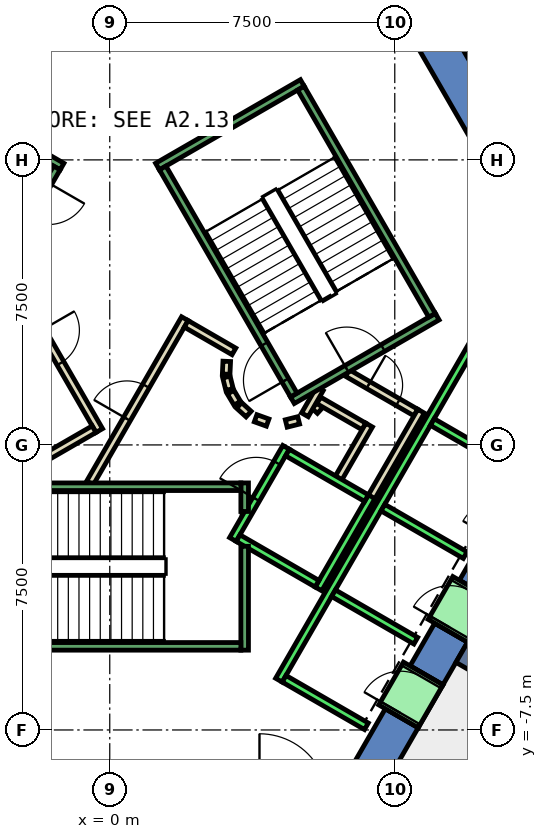
"""IFC4 building model, lengths in metres.
Left out: names, types, materials, properties, quantities, classifications, styles, units other than length and angle.
Written with IfcOpenShell. Run it as: python <this file> out.ifc"""

import sys

from ifc_helpers import new_model, si_unit, direction, frame, frame_2d, origin, place, context, subcontext, project, spatial, polyline, rectangle, outline, extrude, element, fill, save


model = new_model("IFC4")
c1 = context("Model", 3, precision=1e-05, world=origin(), true_north=direction((0.0, 1.0)))
c2 = subcontext(c1, "Body", "Model", "MODEL_VIEW")
j1 = project(units=[si_unit("LENGTHUNIT", "METRE"), si_unit("PLANEANGLEUNIT", "RADIAN")], contexts=[c1])
p1 = place(None, origin())
s1 = spatial("IfcSite", under=j1, at=p1, CompositionType="ELEMENT")
p2 = place(p1, origin())
s2 = spatial("IfcBuilding", under=s1, at=p2, CompositionType="ELEMENT")
p3 = place(p2, frame((0.0, 0.0, 51.8)))
s3 = spatial("IfcBuildingStorey", under=s2, at=p3, CompositionType="ELEMENT", Elevation=51.8)
p4 = place(p3, frame((0.0, 0.0, -0.4)))
e1 = element("IfcWall", 1, at=p4, inside=s3, PredefinedType="SHEAR", context=c2, shape_type="SweptSolid", body=[
    extrude(outline(polyline([(8.517, 11.748), (7.651, 11.248), (12.702, 2.5), (13.856, 2.5), (8.517, 11.748)])), origin(), (0.0, 0.0, 1.0), 4.2),
])
p5 = place(p3, frame((0.0, 0.0, -0.4)))
e2 = element("IfcWall", 2, at=p5, inside=s3, PredefinedType="SHEAR", context=c2, shape_type="SweptSolid", body=[
    extrude(outline(polyline([(8.117, -7.44), (7.252, -6.94), (6.351, -8.5), (6.928, -9.5), (8.117, -7.44)])), origin(), (0.0, 0.0, 1.0), 4.2),
])
p6 = place(p3, frame((0.0, 0.0, -0.4)))
e3 = element("IfcWall", 3, at=p6, inside=s3, PredefinedType="SHEAR", context=c2, shape_type="SweptSolid", body=[
    extrude(outline(polyline([(9.417, -5.189), (8.551, -4.689), (7.902, -5.814), (8.767, -6.314), (9.417, -5.189)])), origin(), (0.0, 0.0, 1.0), 4.2),
])
p7 = place(p3, frame((0.0, 0.0, -0.4)))
e4 = element("IfcWall", 4, at=p7, inside=s3, PredefinedType="SHEAR", context=c2, shape_type="SweptSolid", body=[
    extrude(outline(polyline([(10.717, -2.937), (9.851, -2.437), (9.201, -3.563), (10.067, -4.063), (10.717, -2.937)])), origin(), (0.0, 0.0, 1.0), 4.2),
])
p8 = place(p3, frame((0.0, 0.0, 3.6)))
e5 = element("IfcWall", 5, at=p8, inside=s3, PredefinedType="SHEAR", context=c2, shape_type="SweptSolid", body=[
    extrude(outline(polyline([(8.767, -6.314), (7.902, -5.814), (7.252, -6.94), (8.117, -7.44), (8.767, -6.314)])), origin(), (0.0, 0.0, 1.0), 0.2),
])
p9 = place(p3, frame((0.0, 0.0, 3.6)))
e6 = element("IfcWall", 6, at=p9, inside=s3, PredefinedType="SHEAR", context=c2, shape_type="SweptSolid", body=[
    extrude(outline(polyline([(10.067, -4.063), (9.201, -3.563), (8.551, -4.689), (9.417, -5.189), (10.067, -4.063)])), origin(), (0.0, 0.0, 1.0), 0.2),
])
p10 = place(p3, frame((9.31, -5.375, -0.4), z_axis=(0.0, 0.0, 1.0), x_axis=(0.866017533419, -0.500013631625, 0.0)))
e7 = element("IfcWall", 7, at=p10, inside=s3, PredefinedType="SHEAR", context=c2, shape_type="SweptSolid", body=[
    extrude(rectangle(XDim=9.0, YDim=0.8, at=frame_2d((4.5, 0.0))), origin(), (0.0, 0.0, 1.0), 4.2),
])
p11 = place(p3, frame((5.39, 0.898, 0.0), z_axis=(0.0, 0.0, 1.0), x_axis=(0.673828488714, 0.738887791073, 0.0)))
e8 = element("IfcWall", 8, at=p11, inside=s3, PredefinedType="PARTITIONING", context=c2, shape_type="SweptSolid", body=[
    extrude(rectangle(XDim=0.263, YDim=0.2, at=frame_2d((0.131, 0.0))), origin(), (0.0, 0.0, 1.0), 3.8),
])
p12 = place(p3, frame((5.499, 1.172, 0.0), z_axis=(0.0, 0.0, 1.0), x_axis=(0.866333505267, -0.499465972466, 0.0)))
e9 = element("IfcWall", 9, at=p12, inside=s3, PredefinedType="PARTITIONING", context=c2, shape_type="SweptSolid", body=[
    extrude(rectangle(XDim=1.374, YDim=0.2, at=frame_2d((0.687, 0.0))), origin(), (0.0, 0.0, 1.0), 3.8),
])
p13 = place(p3, frame((6.826, 0.522, 0.0), z_axis=(0.0, 0.0, 1.0), x_axis=(-0.500016722714, -0.866015748706, 0.0)))
e10 = element("IfcWall", 10, at=p13, inside=s3, PredefinedType="PARTITIONING", context=c2, shape_type="SweptSolid", body=[
    extrude(rectangle(XDim=1.7, YDim=0.2, at=frame_2d((0.85, 0.0))), origin(), (0.0, 0.0, 1.0), 3.8),
])
p14 = place(p3, frame((6.25, 1.894, 0.0), z_axis=(0.0, 0.0, 1.0), x_axis=(0.866043184279, -0.499969202016, 0.0)))
e11 = element("IfcWall", 11, at=p14, inside=s3, PredefinedType="PARTITIONING", context=c2, shape_type="SweptSolid", body=[
    extrude(rectangle(XDim=2.084, YDim=0.2, at=frame_2d((1.042, 0.0))), origin(), (0.0, 0.0, 1.0), 3.8),
])
p15 = place(p14, frame((0.642, 0.0, 0.0)))
e12 = element("IfcOpeningElement", 12, at=p15, cuts=e11, PredefinedType="OPENING", context=c2, shape_type="SweptSolid", body=[
    extrude(rectangle(XDim=0.9, YDim=2.1, at=frame_2d((0.45, 1.05))), frame((0.0, 0.11, 0.0), z_axis=(0.0, -1.0, 0.0), x_axis=(1.0, 0.0, 0.0)), (0.0, 0.0, 1.0), 0.22),
])
p16 = place(p3, frame((8.192, 0.888, 0.0), z_axis=(0.0, 0.0, 1.0), x_axis=(-0.499940625693, -0.866059680843, 0.0)))
e13 = element("IfcWall", 13, at=p16, inside=s3, PredefinedType="PARTITIONING", context=c2, shape_type="SweptSolid", body=[
    extrude(rectangle(XDim=2.68, YDim=0.2, at=frame_2d((1.34, 0.0))), origin(), (0.0, 0.0, 1.0), 3.8),
])
p17 = place(p3, frame((5.135, 0.793, 0.0), z_axis=(0.0, 0.0, 1.0), x_axis=(0.499526442893, 0.866298639529, 0.0)))
e14 = element("IfcWall", 14, at=p17, inside=s3, PredefinedType="PARTITIONING", context=c2, shape_type="SweptSolid", body=[
    extrude(rectangle(XDim=0.791, YDim=0.2, at=frame_2d((0.396, 0.0))), origin(), (0.0, 0.0, 1.0), 3.8),
])
p18 = place(p3, frame((-0.52, -1.0, 0.0), z_axis=(0.0, 0.0, 1.0), x_axis=(0.50011622646, 0.865958290007, 0.0)))
e15 = element("IfcWall", 15, at=p18, inside=s3, PredefinedType="PARTITIONING", context=c2, shape_type="SweptSolid", body=[
    extrude(rectangle(XDim=4.991, YDim=0.2, at=frame_2d((2.496, 0.0))), origin(), (0.0, 0.0, 1.0), 3.8),
])
p19 = place(p18, frame((1.945, 0.0, 0.0)))
e16 = element("IfcOpeningElement", 16, at=p19, cuts=e15, PredefinedType="OPENING", context=c2, shape_type="SweptSolid", body=[
    extrude(rectangle(XDim=1.0, YDim=2.1, at=frame_2d((0.5, 1.05))), frame((0.0, 0.11, 0.0), z_axis=(0.0, -1.0, 0.0), x_axis=(1.0, 0.0, 0.0)), (0.0, 0.0, 1.0), 0.22),
])
p20 = place(p3, frame((2.012, 3.186, 0.0), z_axis=(0.0, 0.0, 1.0), x_axis=(0.865891012941, -0.500232699559, 0.0)))
e17 = element("IfcWall", 17, at=p20, inside=s3, PredefinedType="PARTITIONING", context=c2, shape_type="SweptSolid", body=[
    extrude(rectangle(XDim=1.449, YDim=0.2, at=frame_2d((0.725, 0.0))), origin(), (0.0, 0.0, 1.0), 3.8),
])
p21 = place(p3, frame((3.079, 2.199, 0.0), z_axis=(0.0, 0.0, 1.0), x_axis=(-0.047771483479, -0.998858290933, 0.0)))
e18 = element("IfcWall", 18, at=p21, inside=s3, PredefinedType="PARTITIONING", context=c2, shape_type="SweptSolid", body=[
    extrude(rectangle(XDim=0.337, YDim=0.2, at=frame_2d((0.169, 0.0))), origin(), (0.0, 0.0, 1.0), 3.8),
])
p22 = place(p3, frame((3.07, 1.786, 0.0), z_axis=(0.0, 0.0, 1.0), x_axis=(0.242705583207, -0.970099994784, 0.0)))
e19 = element("IfcWall", 19, at=p22, inside=s3, PredefinedType="PARTITIONING", context=c2, shape_type="SweptSolid", body=[
    extrude(rectangle(XDim=0.338, YDim=0.2, at=frame_2d((0.169, 0.0))), origin(), (0.0, 0.0, 1.0), 3.8),
])
for number, where, z_axis, x_axis in (
    (20, (3.182, 1.388, 0.0), (0.0, 0.0, 1.0), (0.512, -0.859, 0.0)),
    (21, (3.404, 1.039, 0.0), (0.0, 0.0, 1.0), (0.74, -0.672, 0.0)),
):
    element("IfcWall", number, at=place(p3, frame(where, z_axis=z_axis, x_axis=x_axis)), inside=s3, PredefinedType="PARTITIONING", context=c2, shape_type="SweptSolid", body=[
        extrude(rectangle(XDim=0.338, YDim=0.2, at=frame_2d((0.169, 0.0))), origin(), (0.0, 0.0, 1.0), 3.8),
    ])
p23 = place(p3, frame((3.838, 0.702, 0.0), z_axis=(0.0, 0.0, 1.0), x_axis=(0.941035081519, -0.338308993895, 0.0)))
e22 = element("IfcWall", 22, at=p23, inside=s3, PredefinedType="PARTITIONING", context=c2, shape_type="SweptSolid", body=[
    extrude(rectangle(XDim=0.337, YDim=0.2, at=frame_2d((0.168, 0.0))), origin(), (0.0, 0.0, 1.0), 3.8),
])
p24 = place(p3, frame((4.644, 0.564, 0.0), z_axis=(0.0, 0.0, 1.0), x_axis=(0.969929076366, 0.243387729394, 0.0)))
e23 = element("IfcWall", 23, at=p24, inside=s3, PredefinedType="PARTITIONING", context=c2, shape_type="SweptSolid", body=[
    extrude(rectangle(XDim=0.337, YDim=0.2, at=frame_2d((0.168, 0.0))), origin(), (0.0, 0.0, 1.0), 3.8),
])
p25 = place(p3, frame((-2.771, 4.7, 0.0), z_axis=(0.0, 0.0, 1.0), x_axis=(0.499969479948, -0.866043023828, 0.0)))
e24 = element("IfcWall", 24, at=p25, inside=s3, PredefinedType="PARTITIONING", context=c2, shape_type="SweptSolid", body=[
    extrude(rectangle(XDim=4.99, YDim=0.2, at=frame_2d((2.495, 0.0))), origin(), (0.0, 0.0, 1.0), 3.8),
])
p26 = place(p25, frame((1.945, 0.0, 0.0)))
e25 = element("IfcOpeningElement", 25, at=p26, cuts=e24, PredefinedType="OPENING", context=c2, shape_type="SweptSolid", body=[
    extrude(rectangle(XDim=1.0, YDim=2.1, at=frame_2d((0.5, 1.05))), frame((0.0, 0.11, 0.0), z_axis=(0.0, -1.0, 0.0), x_axis=(1.0, 0.0, 0.0)), (0.0, 0.0, 1.0), 0.22),
])
p27 = place(p3, frame((-0.412, 0.414, 0.0), z_axis=(0.0, 0.0, 1.0), x_axis=(-0.866017369001, -0.500013916395, 0.0)))
e26 = element("IfcWall", 26, at=p27, inside=s3, PredefinedType="PARTITIONING", context=c2, shape_type="SweptSolid", body=[
    extrude(rectangle(XDim=1.45, YDim=0.2, at=frame_2d((0.725, 0.0))), origin(), (0.0, 0.0, 1.0), 3.8),
])
p28 = place(p3, frame((12.401, -7.621, 0.0), z_axis=(0.0, 0.0, 1.0), x_axis=(-0.499983724212, -0.866034800411, 0.0)))
e27 = element("IfcWall", 27, at=p28, inside=s3, PredefinedType="PARTITIONING", context=c2, shape_type="SweptSolid", body=[
    extrude(rectangle(XDim=9.302, YDim=0.2, at=frame_2d((4.651, 0.0))), origin(), (0.0, 0.0, 1.0), 3.8),
])
p29 = place(p3, frame((3.24, -2.488, 0.0), z_axis=(0.0, 0.0, 1.0), x_axis=(0.49994636267, 0.866056369097, 0.0)))
e28 = element("IfcWall", 28, at=p29, inside=s3, PredefinedType="STANDARD", context=c2, shape_type="SweptSolid", body=[
    extrude(rectangle(XDim=2.8, YDim=0.2, at=frame_2d((1.4, 0.0))), origin(), (0.0, 0.0, 1.0), 3.8),
])
p30 = place(p29, frame((1.225, 0.0, 0.0)))
e29 = element("IfcOpeningElement", 29, at=p30, cuts=e28, PredefinedType="OPENING", context=c2, shape_type="SweptSolid", body=[
    extrude(rectangle(XDim=1.1, YDim=2.1, at=frame_2d((0.55, 1.05))), frame((0.0, 0.11, 0.0), z_axis=(0.0, -1.0, 0.0), x_axis=(1.0, 0.0, 0.0)), (0.0, 0.0, 1.0), 0.22),
])
p31 = place(p3, frame((5.492, -3.788, 0.0), z_axis=(0.0, 0.0, 1.0), x_axis=(0.500011755427, 0.866018616679, 0.0)))
e30 = element("IfcWall", 30, at=p31, inside=s3, PredefinedType="STANDARD", context=c2, shape_type="SweptSolid", body=[
    extrude(rectangle(XDim=2.8, YDim=0.2, at=frame_2d((1.4, 0.0))), origin(), (0.0, 0.0, 1.0), 3.8),
])
p32 = place(p3, frame((3.377, -2.452, 0.0), z_axis=(0.0, 0.0, 1.0), x_axis=(0.865955154139, -0.50012165622, 0.0)))
e31 = element("IfcWall", 31, at=p32, inside=s3, PredefinedType="STANDARD", context=c2, shape_type="SweptSolid", body=[
    extrude(rectangle(XDim=2.4, YDim=0.2, at=frame_2d((1.2, 0.0))), origin(), (0.0, 0.0, 1.0), 3.8),
])
p33 = place(p3, frame((4.677, -0.2, 0.0), z_axis=(0.0, 0.0, 1.0), x_axis=(0.865973769406, -0.500089422704, 0.0)))
e32 = element("IfcWall", 32, at=p33, inside=s3, PredefinedType="STANDARD", context=c2, shape_type="SweptSolid", body=[
    extrude(rectangle(XDim=2.399, YDim=0.2, at=frame_2d((1.2, 0.0))), origin(), (0.0, 0.0, 1.0), 3.8),
])
p34 = place(p3, frame((4.451, -6.19, 0.0), z_axis=(0.0, 0.0, 1.0), x_axis=(0.50000090737, 0.866024879913, 0.0)))
e33 = element("IfcWall", 33, at=p34, inside=s3, PredefinedType="STANDARD", context=c2, shape_type="SweptSolid", body=[
    extrude(rectangle(XDim=10.6, YDim=0.2, at=frame_2d((5.3, 0.0))), origin(), (0.0, 0.0, 1.0), 3.8),
])
for number, where, z_axis, x_axis in (
    (34, (4.588, -6.153, 0.0), (0.0, 0.0, 1.0), (0.866, -0.5, 0.0)),
    (35, (5.888, -3.902, 0.0), (0.0, 0.0, 1.0), (0.866, -0.5, 0.0)),
    (36, (7.188, -1.65, 0.0), (0.0, 0.0, 1.0), (0.866, -0.5, 0.0)),
    (37, (8.488, 0.602, 0.0), (0.0, 0.0, 1.0), (0.866, -0.5, 0.0)),
):
    element("IfcWall", number, at=place(p3, frame(where, z_axis=z_axis, x_axis=x_axis)), inside=s3, PredefinedType="STANDARD", context=c2, shape_type="SweptSolid", body=[
        extrude(rectangle(XDim=2.5, YDim=0.2, at=frame_2d((1.25, 0.0))), origin(), (0.0, 0.0, 1.0), 3.8),
    ])
p35 = place(p3, frame((7.598, -7.14, 0.0), z_axis=(0.0, 0.0, 1.0), x_axis=(0.500362116554, 0.865816234728, 0.0)))
e38 = element("IfcWall", 38, at=p35, inside=s3, PredefinedType="STANDARD", context=c2, shape_type="SweptSolid", body=[
    extrude(rectangle(XDim=1.299, YDim=1.2, at=frame_2d((0.65, 0.0))), origin(), (0.0, 0.0, 1.0), 2.4),
])
p36 = place(p35, frame((0.1, 0.0, 0.0)))
e39 = element("IfcOpeningElement", 39, at=p36, cuts=e38, PredefinedType="OPENING", context=c2, shape_type="SweptSolid", body=[
    extrude(rectangle(XDim=1.1, YDim=2.3, at=frame_2d((0.55, 1.15))), frame((0.0, 0.61, 0.0), z_axis=(0.0, -1.0, 0.0), x_axis=(1.0, 0.0, 0.0)), (0.0, 0.0, 1.0), 1.22),
])
p37 = place(p3, frame((8.898, -4.889, 0.0), z_axis=(0.0, 0.0, 1.0), x_axis=(0.500036693733, 0.866004217611, 0.0)))
e40 = element("IfcWall", 40, at=p37, inside=s3, PredefinedType="STANDARD", context=c2, shape_type="SweptSolid", body=[
    extrude(rectangle(XDim=1.3, YDim=1.2, at=frame_2d((0.65, 0.0))), origin(), (0.0, 0.0, 1.0), 2.4),
])
p38 = place(p37, frame((0.1, 0.0, 0.0)))
e41 = element("IfcOpeningElement", 41, at=p38, cuts=e40, PredefinedType="OPENING", context=c2, shape_type="SweptSolid", body=[
    extrude(rectangle(XDim=1.1, YDim=2.3, at=frame_2d((0.55, 1.15))), frame((0.0, 0.61, 0.0), z_axis=(0.0, -1.0, 0.0), x_axis=(1.0, 0.0, 0.0)), (0.0, 0.0, 1.0), 1.22),
])
p39 = place(p3, frame((3.55, -2.667, 0.0), z_axis=(0.0, 0.0, 1.0), x_axis=(0.0, -1.0, 0.0)))
e42 = element("IfcWall", 42, at=p39, inside=s3, PredefinedType="STANDARD", context=c2, shape_type="SweptSolid", body=[
    extrude(rectangle(XDim=2.733, YDim=0.2, at=frame_2d((1.366, 0.0))), origin(), (0.0, 0.0, 1.0), 3.8),
])
p40 = place(p3, frame((3.55, -1.0, 0.0), z_axis=(0.0, 0.0, 1.0), x_axis=(0.0, -1.0, 0.0)))
e43 = element("IfcWall", 43, at=p40, inside=s3, PredefinedType="STANDARD", context=c2, shape_type="SweptSolid", body=[
    extrude(rectangle(XDim=0.751, YDim=0.2, at=frame_2d((0.375, 0.0))), origin(), (0.0, 0.0, 1.0), 3.8),
])
p41 = place(p3, frame((-3.45, -1.1, 0.0), z_axis=(0.0, 0.0, 1.0), x_axis=(1.0, 0.0, 0.0)))
e44 = element("IfcWall", 44, at=p41, inside=s3, PredefinedType="STANDARD", context=c2, shape_type="SweptSolid", body=[
    extrude(rectangle(XDim=6.9, YDim=0.2, at=frame_2d((3.45, 0.0))), origin(), (0.0, 0.0, 1.0), 3.8),
])
p42 = place(p41, frame((0.45, 0.0, 0.0)))
e45 = element("IfcOpeningElement", 45, at=p42, cuts=e44, PredefinedType="OPENING", context=c2, shape_type="SweptSolid", body=[
    extrude(rectangle(XDim=1.1, YDim=2.2, at=frame_2d((0.55, 1.1))), frame((0.0, 0.11, 0.0), z_axis=(0.0, -1.0, 0.0), x_axis=(1.0, 0.0, 0.0)), (0.0, 0.0, 1.0), 0.22),
])
p43 = place(p3, frame((-3.45, -5.3, 0.0), z_axis=(0.0, 0.0, 1.0), x_axis=(1.0, 0.0, 0.0)))
e46 = element("IfcWall", 46, at=p43, inside=s3, PredefinedType="STANDARD", context=c2, shape_type="SweptSolid", body=[
    extrude(rectangle(XDim=6.9, YDim=0.2, at=frame_2d((3.45, 0.0))), origin(), (0.0, 0.0, 1.0), 3.8),
])
p44 = place(p3, frame((4.806, 1.176, 0.0), z_axis=(0.0, 0.0, 1.0), x_axis=(0.866059941101, 0.499940174841, 0.0)))
e47 = element("IfcWall", 47, at=p44, inside=s3, PredefinedType="STANDARD", context=c2, shape_type="SweptSolid", body=[
    extrude(rectangle(XDim=4.4, YDim=0.2, at=frame_2d((2.2, 0.0))), origin(), (0.0, 0.0, 1.0), 3.8),
])
p45 = place(p44, frame((1.65, 0.0, 0.0)))
e48 = element("IfcOpeningElement", 48, at=p45, cuts=e47, PredefinedType="OPENING", context=c2, shape_type="SweptSolid", body=[
    extrude(rectangle(XDim=1.1, YDim=2.2, at=frame_2d((0.55, 1.1))), frame((0.0, 0.11, 0.0), z_axis=(0.0, -1.0, 0.0), x_axis=(1.0, 0.0, 0.0)), (0.0, 0.0, 1.0), 0.22),
])
p46 = place(p3, frame((1.256, 7.324, 0.0), z_axis=(0.0, 0.0, 1.0), x_axis=(0.866046073146, 0.499964197906, 0.0)))
e49 = element("IfcWall", 49, at=p46, inside=s3, PredefinedType="STANDARD", context=c2, shape_type="SweptSolid", body=[
    extrude(rectangle(XDim=4.4, YDim=0.2, at=frame_2d((2.2, 0.0))), origin(), (0.0, 0.0, 1.0), 3.8),
])
p47 = place(p3, frame((4.843, 1.312, 0.0), z_axis=(0.0, 0.0, 1.0), x_axis=(-0.499963383562, 0.866046543262, 0.0)))
e50 = element("IfcWall", 50, at=p47, inside=s3, PredefinedType="STANDARD", context=c2, shape_type="SweptSolid", body=[
    extrude(rectangle(XDim=6.9, YDim=0.2, at=frame_2d((3.45, 0.0))), origin(), (0.0, 0.0, 1.0), 3.8),
])
p48 = place(p47, frame((0.45, 0.0, 0.0)))
e51 = element("IfcOpeningElement", 51, at=p48, cuts=e50, PredefinedType="OPENING", context=c2, shape_type="SweptSolid", body=[
    extrude(rectangle(XDim=1.1, YDim=2.2, at=frame_2d((0.55, 1.1))), frame((0.0, 0.11, 0.0), z_axis=(0.0, -1.0, 0.0), x_axis=(1.0, 0.0, 0.0)), (0.0, 0.0, 1.0), 0.22),
])
p49 = place(p3, frame((8.48, 3.412, 0.0), z_axis=(0.0, 0.0, 1.0), x_axis=(-0.499978703459, 0.866037698999, 0.0)))
e52 = element("IfcWall", 52, at=p49, inside=s3, PredefinedType="STANDARD", context=c2, shape_type="SweptSolid", body=[
    extrude(rectangle(XDim=6.9, YDim=0.2, at=frame_2d((3.45, 0.0))), origin(), (0.0, 0.0, 1.0), 3.8),
])
p50 = place(p3, frame((-1.256, 7.324, 0.0), z_axis=(0.0, 0.0, 1.0), x_axis=(-0.866046073146, 0.499964197906, 0.0)))
e53 = element("IfcWall", 53, at=p50, inside=s3, PredefinedType="STANDARD", context=c2, shape_type="SweptSolid", body=[
    extrude(rectangle(XDim=4.4, YDim=0.2, at=frame_2d((2.2, 0.0))), origin(), (0.0, 0.0, 1.0), 3.8),
])
p51 = place(p50, frame((1.65, 0.0, 0.0)))
e54 = element("IfcOpeningElement", 54, at=p51, cuts=e53, PredefinedType="OPENING", context=c2, shape_type="SweptSolid", body=[
    extrude(rectangle(XDim=1.1, YDim=2.2, at=frame_2d((0.55, 1.1))), frame((0.0, 0.11, 0.0), z_axis=(0.0, -1.0, 0.0), x_axis=(1.0, 0.0, 0.0)), (0.0, 0.0, 1.0), 0.22),
])
p52 = place(p3, frame((-1.393, 7.288, 0.0), z_axis=(0.0, 0.0, 1.0), x_axis=(-0.499963383562, -0.866046543262, 0.0)))
e55 = element("IfcWall", 55, at=p52, inside=s3, PredefinedType="STANDARD", context=c2, shape_type="SweptSolid", body=[
    extrude(rectangle(XDim=6.9, YDim=0.2, at=frame_2d((3.45, 0.0))), origin(), (0.0, 0.0, 1.0), 3.8),
])
p53 = place(p52, frame((0.45, 0.0, 0.0)))
e56 = element("IfcOpeningElement", 56, at=p53, cuts=e55, PredefinedType="OPENING", context=c2, shape_type="SweptSolid", body=[
    extrude(rectangle(XDim=1.1, YDim=2.2, at=frame_2d((0.55, 1.1))), frame((0.0, 0.11, 0.0), z_axis=(0.0, -1.0, 0.0), x_axis=(1.0, 0.0, 0.0)), (0.0, 0.0, 1.0), 0.22),
])
p54 = place(p19, origin())
e57 = element("IfcDoor", 57, at=p54, inside=s3, OperationType="SINGLE_SWING_LEFT", PredefinedType="DOOR", context=c2, shape_type="SweptSolid", body=[
    extrude(rectangle(XDim=1.0, YDim=2.1, at=frame_2d((0.5, 1.05))), frame((0.0, 0.025, 0.0), z_axis=(0.0, -1.0, 0.0), x_axis=(1.0, 0.0, 0.0)), (0.0, 0.0, 1.0), 0.05),
])
fill(e16, e57)
p55 = place(p26, origin())
e58 = element("IfcDoor", 58, at=p55, inside=s3, OperationType="SINGLE_SWING_RIGHT", PredefinedType="DOOR", context=c2, shape_type="SweptSolid", body=[
    extrude(rectangle(XDim=1.0, YDim=2.1, at=frame_2d((0.5, 1.05))), frame((0.0, 0.025, 0.0), z_axis=(0.0, -1.0, 0.0), x_axis=(1.0, 0.0, 0.0)), (0.0, 0.0, 1.0), 0.05),
])
fill(e25, e58)
p56 = place(p15, origin())
e59 = element("IfcDoor", 59, at=p56, inside=s3, OperationType="SINGLE_SWING_LEFT", PredefinedType="DOOR", context=c2, shape_type="SweptSolid", body=[
    extrude(rectangle(XDim=0.9, YDim=2.1, at=frame_2d((0.45, 1.05))), frame((0.0, 0.025, 0.0), z_axis=(0.0, -1.0, 0.0), x_axis=(1.0, 0.0, 0.0)), (0.0, 0.0, 1.0), 0.05),
])
fill(e12, e59)
p57 = place(p36, origin())
e60 = element("IfcDoor", 60, at=p57, inside=s3, OperationType="SLIDING_TO_LEFT", PredefinedType="DOOR", context=c2, shape_type="SweptSolid", body=[
    extrude(rectangle(XDim=1.1, YDim=2.3, at=frame_2d((0.55, 1.15))), frame((0.0, 0.025, 0.0), z_axis=(0.0, -1.0, 0.0), x_axis=(1.0, 0.0, 0.0)), (0.0, 0.0, 1.0), 0.05),
])
fill(e39, e60)
p58 = place(p38, origin())
e61 = element("IfcDoor", 61, at=p58, inside=s3, OperationType="SLIDING_TO_LEFT", PredefinedType="DOOR", context=c2, shape_type="SweptSolid", body=[
    extrude(rectangle(XDim=1.1, YDim=2.3, at=frame_2d((0.55, 1.15))), frame((0.0, 0.025, 0.0), z_axis=(0.0, -1.0, 0.0), x_axis=(1.0, 0.0, 0.0)), (0.0, 0.0, 1.0), 0.05),
])
fill(e41, e61)
p59 = place(p30, origin())
e62 = element("IfcDoor", 62, at=p59, inside=s3, OperationType="SLIDING_TO_LEFT", PredefinedType="DOOR", context=c2, shape_type="SweptSolid", body=[
    extrude(rectangle(XDim=1.1, YDim=2.1, at=frame_2d((0.55, 1.05))), frame((0.0, 0.025, 0.0), z_axis=(0.0, -1.0, 0.0), x_axis=(1.0, 0.0, 0.0)), (0.0, 0.0, 1.0), 0.05),
])
fill(e29, e62)
p60 = place(p48, origin())
e63 = element("IfcDoor", 63, at=p60, inside=s3, OperationType="SINGLE_SWING_LEFT", PredefinedType="DOOR", context=c2, shape_type="SweptSolid", body=[
    extrude(rectangle(XDim=1.1, YDim=2.2, at=frame_2d((0.55, 1.1))), frame((0.0, 0.025, 0.0), z_axis=(0.0, -1.0, 0.0), x_axis=(1.0, 0.0, 0.0)), (0.0, 0.0, 1.0), 0.05),
])
fill(e51, e63)
p61 = place(p45, origin())
e64 = element("IfcDoor", 64, at=p61, inside=s3, OperationType="SINGLE_SWING_LEFT", PredefinedType="DOOR", context=c2, shape_type="SweptSolid", body=[
    extrude(rectangle(XDim=1.1, YDim=2.2, at=frame_2d((0.55, 1.1))), frame((0.0, 0.025, 0.0), z_axis=(0.0, -1.0, 0.0), x_axis=(1.0, 0.0, 0.0)), (0.0, 0.0, 1.0), 0.05),
])
fill(e48, e64)
save(model, sys.argv[1])
